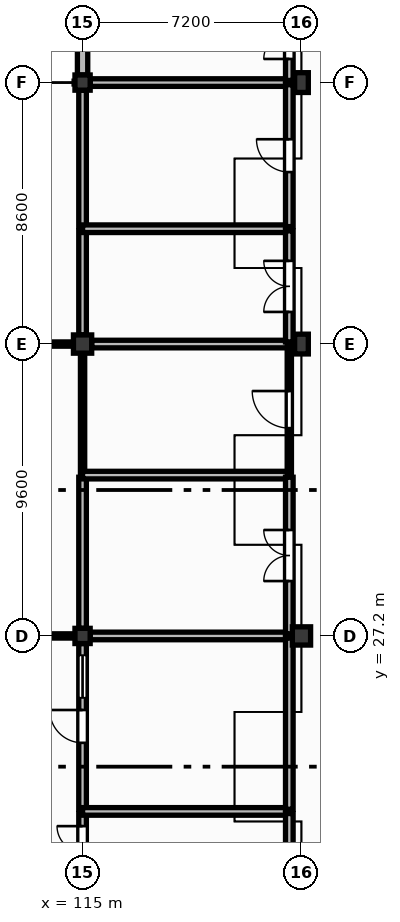
"""IFC4 building model, lengths in metres.
Left out: names, types, materials, properties, quantities, classifications, styles, units other than length and angle.
Written with IfcOpenShell. Run it as: python <this file> out.ifc"""

import sys

from ifc_helpers import new_model, si_unit, direction, frame, frame_2d, origin, origin_2d, place, context, subcontext, project, spatial, rectangle, extrude, element, fill, save


model = new_model("IFC4")
c1 = context("Model", 3, precision=1e-05, world=origin(), true_north=direction((0.0, 1.0)))
c2 = subcontext(c1, "Body", "Model", "MODEL_VIEW")
j1 = project(units=[si_unit("LENGTHUNIT", "METRE"), si_unit("PLANEANGLEUNIT", "RADIAN")], contexts=[c1])
p1 = place(None, origin())
s1 = spatial("IfcSite", under=j1, at=p1, CompositionType="ELEMENT")
p2 = place(p1, origin())
s2 = spatial("IfcBuilding", under=s1, at=p2, CompositionType="ELEMENT")
p3 = place(p2, origin())
s3 = spatial("IfcBuildingStorey", under=s2, at=p3, CompositionType="ELEMENT", Elevation=0.0)
p4 = place(p3, frame((115.0, 27.2, 0.0), z_axis=(0.0, 0.0, 1.0), x_axis=(1.0, 0.0, 0.0)))
e1 = element("IfcColumn", 1, at=p4, inside=s3, PredefinedType="COLUMN", context=c2, shape_type="SweptSolid", body=[
    extrude(rectangle(XDim=0.5, YDim=0.5, at=origin_2d()), origin(), (0.0, 0.0, 1.0), 4.2),
])
p5 = place(p3, frame((115.0, 36.8, 0.0), z_axis=(0.0, 0.0, 1.0), x_axis=(1.0, 0.0, 0.0)))
e2 = element("IfcColumn", 2, at=p5, inside=s3, PredefinedType="COLUMN", context=c2, shape_type="SweptSolid", body=[
    extrude(rectangle(XDim=0.6, YDim=0.6, at=origin_2d()), origin(), (0.0, 0.0, 1.0), 4.2),
])
p6 = place(p3, frame((115.0, 45.4, 0.0), z_axis=(0.0, 0.0, 1.0), x_axis=(1.0, 0.0, 0.0)))
e3 = element("IfcColumn", 3, at=p6, inside=s3, PredefinedType="COLUMN", context=c2, shape_type="SweptSolid", body=[
    extrude(rectangle(XDim=0.5, YDim=0.5, at=origin_2d()), origin(), (0.0, 0.0, 1.0), 4.2),
])
p7 = place(p3, frame((122.2, 27.2, 0.0), z_axis=(0.0, 0.0, 1.0), x_axis=(1.0, 0.0, 0.0)))
e4 = element("IfcColumn", 4, at=p7, inside=s3, PredefinedType="COLUMN", context=c2, shape_type="SweptSolid", body=[
    extrude(rectangle(XDim=0.6, YDim=0.6, at=origin_2d()), origin(), (0.0, 0.0, 1.0), 4.2),
])
for number, where, z_axis, x_axis in (
    (5, (122.2, 36.8, 0.0), (0.0, 0.0, 1.0), (1.0, 0.0, 0.0)),
    (6, (122.2, 45.4, 0.0), (0.0, 0.0, 1.0), (1.0, 0.0, 0.0)),
):
    element("IfcColumn", number, at=place(p3, frame(where, z_axis=z_axis, x_axis=x_axis)), inside=s3, PredefinedType="COLUMN", context=c2, shape_type="SweptSolid", body=[
        extrude(rectangle(XDim=0.45, YDim=0.65, at=origin_2d()), origin(), (0.0, 0.0, 1.0), 4.2),
    ])
p8 = place(p3, frame((115.0, 45.65, 0.0), z_axis=(0.0, 0.0, 1.0), x_axis=(0.0, 1.0, 0.0)))
e7 = element("IfcWall", 7, at=p8, inside=s3, PredefinedType="SOLIDWALL", context=c2, shape_type="SweptSolid", body=[
    extrude(rectangle(XDim=6.7, YDim=0.34, at=frame_2d((3.35, 0.0))), origin(), (0.0, 0.0, 1.0), 3.68),
])
p9 = place(p8, frame((0.881, 0.0, 1.0)))
e8 = element("IfcOpeningElement", 8, at=p9, cuts=e7, PredefinedType="OPENING", context=c2, shape_type="SweptSolid", body=[
    extrude(rectangle(XDim=1.34, YDim=1.95, at=frame_2d((0.67, 0.975))), frame((0.0, 0.18, 0.0), z_axis=(0.0, -1.0, 0.0), x_axis=(1.0, 0.0, 0.0)), (0.0, 0.0, 1.0), 0.36),
])
p10 = place(p8, frame((4.231, 0.0, 1.0)))
e9 = element("IfcOpeningElement", 9, at=p10, cuts=e7, PredefinedType="OPENING", context=c2, shape_type="SweptSolid", body=[
    extrude(rectangle(XDim=1.1, YDim=2.2, at=frame_2d((0.55, 1.1))), frame((0.0, 0.18, 0.0), z_axis=(0.0, -1.0, 0.0), x_axis=(1.0, 0.0, 0.0)), (0.0, 0.0, 1.0), 0.36),
])
p11 = place(p3, frame((110.6, 27.2, 0.0), z_axis=(0.0, 0.0, 1.0), x_axis=(1.0, 0.0, 0.0)))
e10 = element("IfcWall", 10, at=p11, inside=s3, PredefinedType="PARTITIONING", context=c2, shape_type="SweptSolid", body=[
    extrude(rectangle(XDim=4.15, YDim=0.14, at=frame_2d((2.075, 0.0))), origin(), (0.0, 0.0, 1.0), 3.6),
])
p12 = place(p3, frame((110.6, 36.8, 0.0), z_axis=(0.0, 0.0, 1.0), x_axis=(1.0, 0.0, 0.0)))
e11 = element("IfcWall", 11, at=p12, inside=s3, PredefinedType="PARTITIONING", context=c2, shape_type="SweptSolid", body=[
    extrude(rectangle(XDim=4.1, YDim=0.14, at=frame_2d((2.05, 0.0))), origin(), (0.0, 0.0, 1.0), 3.5),
])
p13 = place(p3, frame((115.0, 18.85, 0.0), z_axis=(0.0, 0.0, 1.0), x_axis=(0.0, 1.0, 0.0)))
e12 = element("IfcWall", 12, at=p13, inside=s3, PredefinedType="SOLIDWALL", context=c2, shape_type="SweptSolid", body=[
    extrude(rectangle(XDim=2.509, YDim=0.25, at=frame_2d((1.254, 0.0))), origin(), (0.0, 0.0, 1.0), 3.4),
])
p14 = place(p13, frame((0.415, 0.0, 0.0)))
e13 = element("IfcOpeningElement", 13, at=p14, cuts=e12, PredefinedType="OPENING", context=c2, shape_type="SweptSolid", body=[
    extrude(rectangle(XDim=1.68, YDim=2.3, at=frame_2d((0.84, 1.15))), frame((0.0, 0.135, 0.0), z_axis=(0.0, -1.0, 0.0), x_axis=(1.0, 0.0, 0.0)), (0.0, 0.0, 1.0), 0.27),
])
p15 = place(p3, frame((115.0, 21.499, 0.0), z_axis=(0.0, 0.0, 1.0), x_axis=(0.0, 1.0, 0.0)))
e14 = element("IfcWall", 14, at=p15, inside=s3, PredefinedType="SOLIDWALL", context=c2, shape_type="SweptSolid", body=[
    extrude(rectangle(XDim=5.451, YDim=0.25, at=frame_2d((2.726, 0.0))), origin(), (0.0, 0.0, 1.0), 3.4),
])
p16 = place(p15, frame((2.186, 0.0, 0.0)))
e15 = element("IfcOpeningElement", 15, at=p16, cuts=e14, PredefinedType="OPENING", context=c2, shape_type="SweptSolid", body=[
    extrude(rectangle(XDim=1.08, YDim=2.15, at=frame_2d((0.54, 1.075))), frame((0.0, 0.135, 0.0), z_axis=(0.0, -1.0, 0.0), x_axis=(1.0, 0.0, 0.0)), (0.0, 0.0, 1.0), 0.27),
])
p17 = place(p15, frame((3.666, 0.0, 1.05)))
e16 = element("IfcOpeningElement", 16, at=p17, cuts=e14, PredefinedType="OPENING", context=c2, shape_type="SweptSolid", body=[
    extrude(rectangle(XDim=1.4, YDim=1.1, at=frame_2d((0.7, 0.55))), frame((0.0, 0.135, 0.0), z_axis=(0.0, -1.0, 0.0), x_axis=(1.0, 0.0, 0.0)), (0.0, 0.0, 1.0), 0.27),
])
p18 = place(p3, frame((115.0, 21.429, 0.0), z_axis=(0.0, 0.0, 1.0), x_axis=(1.0, 0.0, 0.0)))
e17 = element("IfcWall", 17, at=p18, inside=s3, PredefinedType="SOLIDWALL", context=c2, shape_type="SweptSolid", body=[
    extrude(rectangle(XDim=6.8, YDim=0.25, at=frame_2d((3.4, 0.0))), origin(), (0.0, 0.0, 1.0), 4.18),
])
p19 = place(p3, frame((115.0, 27.45, 0.0), z_axis=(0.0, 0.0, 1.0), x_axis=(0.0, 1.0, 0.0)))
e18 = element("IfcWall", 18, at=p19, inside=s3, PredefinedType="SOLIDWALL", context=c2, shape_type="SweptSolid", body=[
    extrude(rectangle(XDim=4.97, YDim=0.25, at=frame_2d((2.485, 0.0))), origin(), (0.0, 0.0, 1.0), 3.4),
])
p20 = place(p3, frame((115.25, 27.2, 0.0), z_axis=(0.0, 0.0, 1.0), x_axis=(1.0, 0.0, 0.0)))
e19 = element("IfcWall", 19, at=p20, inside=s3, PredefinedType="SOLIDWALL", context=c2, shape_type="SweptSolid", body=[
    extrude(rectangle(XDim=6.55, YDim=0.25, at=frame_2d((3.275, 0.0))), origin(), (0.0, 0.0, 1.0), 3.6),
])
p21 = place(p3, frame((115.0, 32.56, 0.0), z_axis=(0.0, 0.0, 1.0), x_axis=(0.0, 1.0, 0.0)))
e20 = element("IfcWall", 20, at=p21, inside=s3, PredefinedType="PARTITIONING", context=c2, shape_type="SweptSolid", body=[
    extrude(rectangle(XDim=3.94, YDim=0.14, at=frame_2d((1.97, 0.0))), origin(), (0.0, 0.0, 1.0), 3.4),
])
p22 = place(p3, frame((115.0, 32.49, 0.0), z_axis=(0.0, 0.0, 1.0), x_axis=(1.0, 0.0, 0.0)))
e21 = element("IfcWall", 21, at=p22, inside=s3, PredefinedType="SOLIDWALL", context=c2, shape_type="SweptSolid", body=[
    extrude(rectangle(XDim=6.8, YDim=0.25, at=frame_2d((3.4, 0.0))), origin(), (0.0, 0.0, 1.0), 4.18),
])
p23 = place(p3, frame((115.0, 37.1, 0.0), z_axis=(0.0, 0.0, 1.0), x_axis=(0.0, 1.0, 0.0)))
e22 = element("IfcWall", 22, at=p23, inside=s3, PredefinedType="SOLIDWALL", context=c2, shape_type="SweptSolid", body=[
    extrude(rectangle(XDim=3.423, YDim=0.25, at=frame_2d((1.711, 0.0))), origin(), (0.0, 0.0, 1.0), 3.4),
])
p24 = place(p3, frame((115.3, 36.8, 0.0), z_axis=(0.0, 0.0, 1.0), x_axis=(1.0, 0.0, 0.0)))
e23 = element("IfcWall", 23, at=p24, inside=s3, PredefinedType="SOLIDWALL", context=c2, shape_type="SweptSolid", body=[
    extrude(rectangle(XDim=6.5, YDim=0.25, at=frame_2d((3.25, 0.0))), origin(), (0.0, 0.0, 1.0), 3.5),
])
p25 = place(p3, frame((115.0, 40.663, 0.0), z_axis=(0.0, 0.0, 1.0), x_axis=(0.0, 1.0, 0.0)))
e24 = element("IfcWall", 24, at=p25, inside=s3, PredefinedType="SOLIDWALL", context=c2, shape_type="SweptSolid", body=[
    extrude(rectangle(XDim=4.487, YDim=0.25, at=frame_2d((2.243, 0.0))), origin(), (0.0, 0.0, 1.0), 3.4),
])
p26 = place(p3, frame((115.0, 40.593, 0.0), z_axis=(0.0, 0.0, 1.0), x_axis=(1.0, 0.0, 0.0)))
e25 = element("IfcWall", 25, at=p26, inside=s3, PredefinedType="SOLIDWALL", context=c2, shape_type="SweptSolid", body=[
    extrude(rectangle(XDim=6.8, YDim=0.25, at=frame_2d((3.4, 0.0))), origin(), (0.0, 0.0, 1.0), 4.18),
])
p27 = place(p3, frame((115.25, 45.4, 0.0), z_axis=(0.0, 0.0, 1.0), x_axis=(1.0, 0.0, 0.0)))
e26 = element("IfcWall", 26, at=p27, inside=s3, PredefinedType="SOLIDWALL", context=c2, shape_type="SweptSolid", body=[
    extrude(rectangle(XDim=6.55, YDim=0.25, at=frame_2d((3.275, 0.0))), origin(), (0.0, 0.0, 1.0), 3.25),
])
p28 = place(p3, frame((121.8, 18.67, 0.0), z_axis=(0.0, 0.0, 1.0), x_axis=(0.0, 1.0, 0.0)))
e27 = element("IfcWall", 27, at=p28, inside=s3, PredefinedType="SOLIDWALL", context=c2, shape_type="SweptSolid", body=[
    extrude(rectangle(XDim=2.689, YDim=0.25, at=frame_2d((1.344, 0.0))), origin(), (0.0, 0.0, 1.0), 4.18),
])
p29 = place(p3, frame((121.8, 21.499, 0.0), z_axis=(0.0, 0.0, 1.0), x_axis=(0.0, 1.0, 0.0)))
e28 = element("IfcWall", 28, at=p29, inside=s3, PredefinedType="SOLIDWALL", context=c2, shape_type="SweptSolid", body=[
    extrude(rectangle(XDim=5.631, YDim=0.25, at=frame_2d((2.815, 0.0))), origin(), (0.0, 0.0, 1.0), 4.18),
])
p30 = place(p3, frame((121.8, 27.27, 0.0), z_axis=(0.0, 0.0, 1.0), x_axis=(0.0, 1.0, 0.0)))
e29 = element("IfcWall", 29, at=p30, inside=s3, PredefinedType="SOLIDWALL", context=c2, shape_type="SweptSolid", body=[
    extrude(rectangle(XDim=5.15, YDim=0.25, at=frame_2d((2.575, 0.0))), origin(), (0.0, 0.0, 1.0), 4.18),
])
p31 = place(p30, frame((1.735, 0.0, 0.0)))
e30 = element("IfcOpeningElement", 30, at=p31, cuts=e29, PredefinedType="OPENING", context=c2, shape_type="SweptSolid", body=[
    extrude(rectangle(XDim=1.68, YDim=2.3, at=frame_2d((0.84, 1.15))), frame((0.0, 0.135, 0.0), z_axis=(0.0, -1.0, 0.0), x_axis=(1.0, 0.0, 0.0)), (0.0, 0.0, 1.0), 0.27),
])
p32 = place(p3, frame((121.8, 32.56, 0.0), z_axis=(0.0, 0.0, 1.0), x_axis=(0.0, 1.0, 0.0)))
e31 = element("IfcWall", 31, at=p32, inside=s3, PredefinedType="PARTITIONING", context=c2, shape_type="SweptSolid", body=[
    extrude(rectangle(XDim=4.17, YDim=0.14, at=frame_2d((2.085, 0.0))), origin(), (0.0, 0.0, 1.0), 4.18),
])
p33 = place(p32, frame((1.475, 0.0, 0.0)))
e32 = element("IfcOpeningElement", 32, at=p33, cuts=e31, PredefinedType="OPENING", context=c2, shape_type="SweptSolid", body=[
    extrude(rectangle(XDim=1.22, YDim=2.1, at=frame_2d((0.61, 1.05))), frame((0.0, 0.08, 0.0), z_axis=(0.0, -1.0, 0.0), x_axis=(1.0, 0.0, 0.0)), (0.0, 0.0, 1.0), 0.16),
])
p34 = place(p3, frame((121.8, 36.87, 0.0), z_axis=(0.0, 0.0, 1.0), x_axis=(0.0, 1.0, 0.0)))
e33 = element("IfcWall", 33, at=p34, inside=s3, PredefinedType="SOLIDWALL", context=c2, shape_type="SweptSolid", body=[
    extrude(rectangle(XDim=3.653, YDim=0.25, at=frame_2d((1.826, 0.0))), origin(), (0.0, 0.0, 1.0), 4.18),
])
p35 = place(p34, frame((0.987, 0.0, 0.0)))
e34 = element("IfcOpeningElement", 34, at=p35, cuts=e33, PredefinedType="OPENING", context=c2, shape_type="SweptSolid", body=[
    extrude(rectangle(XDim=1.68, YDim=2.3, at=frame_2d((0.84, 1.15))), frame((0.0, 0.135, 0.0), z_axis=(0.0, -1.0, 0.0), x_axis=(1.0, 0.0, 0.0)), (0.0, 0.0, 1.0), 0.27),
])
p36 = place(p3, frame((121.8, 40.663, 0.0), z_axis=(0.0, 0.0, 1.0), x_axis=(0.0, 1.0, 0.0)))
e35 = element("IfcWall", 35, at=p36, inside=s3, PredefinedType="SOLIDWALL", context=c2, shape_type="SweptSolid", body=[
    extrude(rectangle(XDim=4.667, YDim=0.25, at=frame_2d((2.333, 0.0))), origin(), (0.0, 0.0, 1.0), 4.18),
])
p37 = place(p36, frame((1.793, 0.0, 0.0)))
e36 = element("IfcOpeningElement", 36, at=p37, cuts=e35, PredefinedType="OPENING", context=c2, shape_type="SweptSolid", body=[
    extrude(rectangle(XDim=1.08, YDim=2.15, at=frame_2d((0.54, 1.075))), frame((0.0, 0.135, 0.0), z_axis=(0.0, -1.0, 0.0), x_axis=(1.0, 0.0, 0.0)), (0.0, 0.0, 1.0), 0.27),
])
p38 = place(p3, frame((121.8, 45.47, 0.0), z_axis=(0.0, 0.0, 1.0), x_axis=(0.0, 1.0, 0.0)))
e37 = element("IfcWall", 37, at=p38, inside=s3, PredefinedType="SOLIDWALL", context=c2, shape_type="SweptSolid", body=[
    extrude(rectangle(XDim=3.093, YDim=0.25, at=frame_2d((1.546, 0.0))), origin(), (0.0, 0.0, 1.0), 4.18),
])
p39 = place(p38, frame((0.707, 0.0, 0.0)))
e38 = element("IfcOpeningElement", 38, at=p39, cuts=e37, PredefinedType="OPENING", context=c2, shape_type="SweptSolid", body=[
    extrude(rectangle(XDim=1.68, YDim=2.3, at=frame_2d((0.84, 1.15))), frame((0.0, 0.135, 0.0), z_axis=(0.0, -1.0, 0.0), x_axis=(1.0, 0.0, 0.0)), (0.0, 0.0, 1.0), 0.27),
])
p40 = place(p14, origin())
e39 = element("IfcDoor", 39, at=p40, inside=s3, OperationType="DOUBLE_DOOR_SINGLE_SWING", PredefinedType="DOOR", context=c2, shape_type="SweptSolid", body=[
    extrude(rectangle(XDim=1.68, YDim=2.3, at=frame_2d((0.84, 1.15))), frame((0.0, 0.025, 0.0), z_axis=(0.0, -1.0, 0.0), x_axis=(1.0, 0.0, 0.0)), (0.0, 0.0, 1.0), 0.05),
])
fill(e13, e39)
p41 = place(p16, origin())
e40 = element("IfcDoor", 40, at=p41, inside=s3, OperationType="SINGLE_SWING_RIGHT", PredefinedType="DOOR", context=c2, shape_type="SweptSolid", body=[
    extrude(rectangle(XDim=1.08, YDim=2.15, at=frame_2d((0.54, 1.075))), frame((0.0, 0.025, 0.0), z_axis=(0.0, -1.0, 0.0), x_axis=(1.0, 0.0, 0.0)), (0.0, 0.0, 1.0), 0.05),
])
fill(e15, e40)
p42 = place(p17, origin())
e41 = element("IfcWindow", 41, at=p42, inside=s3, PartitioningType="SINGLE_PANEL", PredefinedType="WINDOW", context=c2, shape_type="SweptSolid", body=[
    extrude(rectangle(XDim=1.4, YDim=1.1, at=frame_2d((0.7, 0.55))), frame((0.0, 0.03, 0.0), z_axis=(0.0, -1.0, 0.0), x_axis=(1.0, 0.0, 0.0)), (0.0, 0.0, 1.0), 0.06),
])
fill(e16, e41)
p43 = place(p31, origin())
e42 = element("IfcDoor", 42, at=p43, inside=s3, OperationType="DOUBLE_DOOR_SINGLE_SWING", PredefinedType="DOOR", context=c2, shape_type="SweptSolid", body=[
    extrude(rectangle(XDim=1.68, YDim=2.3, at=frame_2d((0.84, 1.15))), frame((0.0, 0.025, 0.0), z_axis=(0.0, -1.0, 0.0), x_axis=(1.0, 0.0, 0.0)), (0.0, 0.0, 1.0), 0.05),
])
fill(e30, e42)
p44 = place(p33, origin())
e43 = element("IfcDoor", 43, at=p44, inside=s3, OperationType="SINGLE_SWING_RIGHT", PredefinedType="DOOR", context=c2, shape_type="SweptSolid", body=[
    extrude(rectangle(XDim=1.22, YDim=2.1, at=frame_2d((0.61, 1.05))), frame((0.0, 0.025, 0.0), z_axis=(0.0, -1.0, 0.0), x_axis=(1.0, 0.0, 0.0)), (0.0, 0.0, 1.0), 0.05),
])
fill(e32, e43)
p45 = place(p35, origin())
e44 = element("IfcDoor", 44, at=p45, inside=s3, OperationType="DOUBLE_DOOR_SINGLE_SWING", PredefinedType="DOOR", context=c2, shape_type="SweptSolid", body=[
    extrude(rectangle(XDim=1.68, YDim=2.3, at=frame_2d((0.84, 1.15))), frame((0.0, 0.025, 0.0), z_axis=(0.0, -1.0, 0.0), x_axis=(1.0, 0.0, 0.0)), (0.0, 0.0, 1.0), 0.05),
])
fill(e34, e44)
p46 = place(p37, origin())
e45 = element("IfcDoor", 45, at=p46, inside=s3, OperationType="SINGLE_SWING_RIGHT", PredefinedType="DOOR", context=c2, shape_type="SweptSolid", body=[
    extrude(rectangle(XDim=1.08, YDim=2.15, at=frame_2d((0.54, 1.075))), frame((0.0, 0.025, 0.0), z_axis=(0.0, -1.0, 0.0), x_axis=(1.0, 0.0, 0.0)), (0.0, 0.0, 1.0), 0.05),
])
fill(e36, e45)
p47 = place(p39, origin())
e46 = element("IfcDoor", 46, at=p47, inside=s3, OperationType="DOUBLE_DOOR_SINGLE_SWING", PredefinedType="DOOR", context=c2, shape_type="SweptSolid", body=[
    extrude(rectangle(XDim=1.68, YDim=2.3, at=frame_2d((0.84, 1.15))), frame((0.0, 0.025, 0.0), z_axis=(0.0, -1.0, 0.0), x_axis=(1.0, 0.0, 0.0)), (0.0, 0.0, 1.0), 0.05),
])
fill(e38, e46)
save(model, sys.argv[1])
